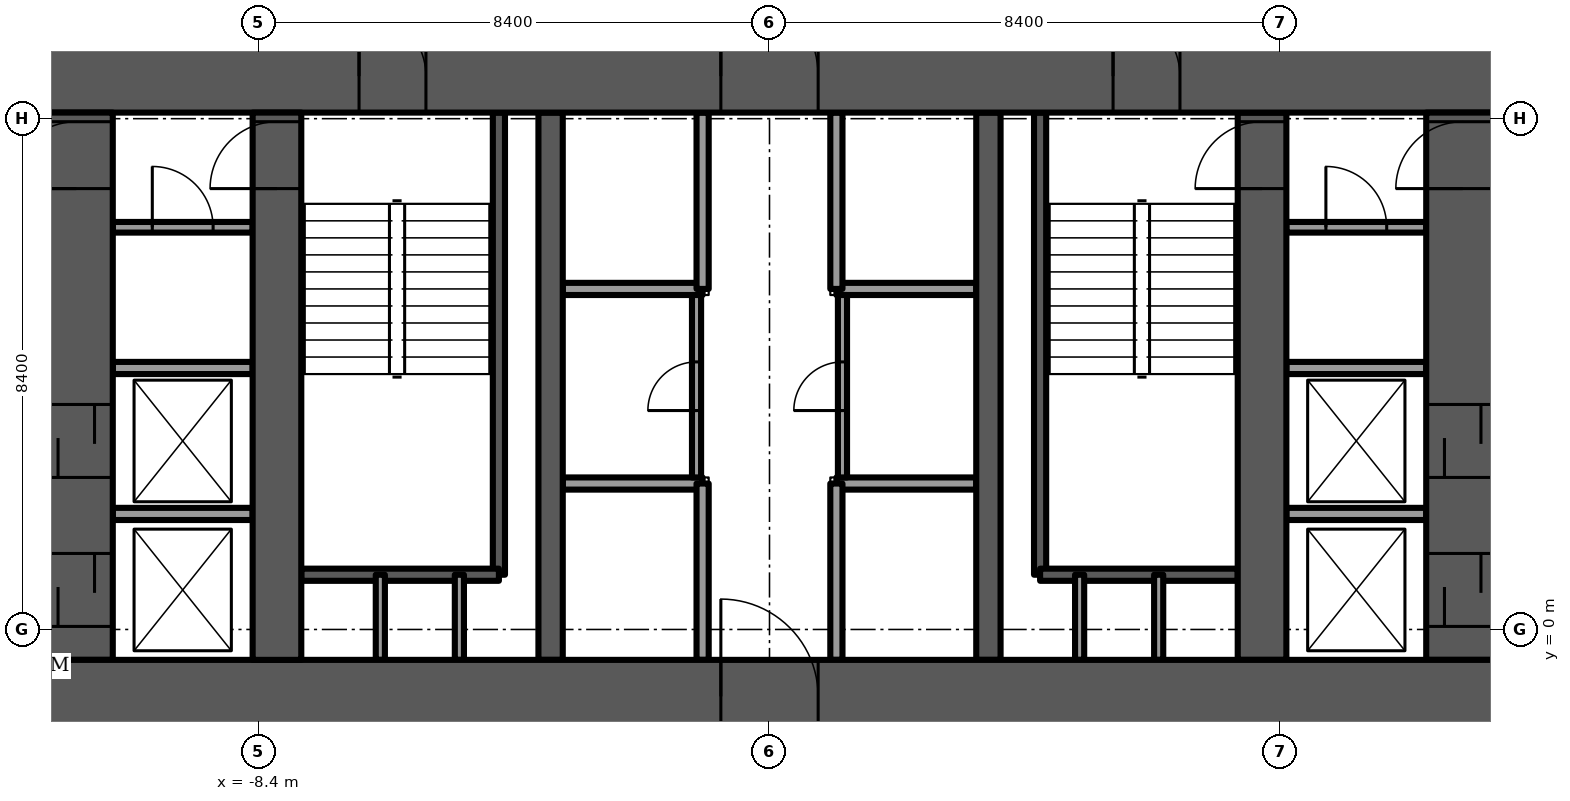
"""IFC4 building model, lengths in metres.
Left out: names, types, materials, properties, quantities, classifications, styles, units other than length and angle.
Written with IfcOpenShell. Run it as: python <this file> out.ifc"""

import sys

from ifc_helpers import new_model, si_unit, direction, frame, frame_2d, origin, place, context, subcontext, project, spatial, rectangle, extrude, element, fill, save


model = new_model("IFC4")
c1 = context("Model", 3, precision=1e-05, world=origin(), true_north=direction((0.0, 1.0)))
c2 = subcontext(c1, "Body", "Model", "MODEL_VIEW")
j1 = project(units=[si_unit("LENGTHUNIT", "METRE"), si_unit("PLANEANGLEUNIT", "RADIAN")], contexts=[c1])
p1 = place(None, origin())
s1 = spatial("IfcSite", under=j1, at=p1, CompositionType="ELEMENT")
p2 = place(p1, origin())
s2 = spatial("IfcBuilding", under=s1, at=p2, CompositionType="ELEMENT")
p3 = place(p2, frame((0.0, 0.0, 73.0)))
s3 = spatial("IfcBuildingStorey", under=s2, at=p3, CompositionType="ELEMENT", Elevation=73.0)
p4 = place(p3, frame((-12.0, -1.1, -0.3), z_axis=(0.0, 0.0, 1.0), x_axis=(1.0, 0.0, 0.0)))
e1 = element("IfcWall", 1, at=p4, inside=s3, PredefinedType="SHEAR", context=c2, shape_type="SweptSolid", body=[
    extrude(rectangle(XDim=24.0, YDim=1.2, at=frame_2d((12.0, 0.0))), origin(), (0.0, 0.0, 1.0), 3.75),
])
p5 = place(p4, frame((11.2, 0.0, 0.0)))
e2 = element("IfcOpeningElement", 2, at=p5, cuts=e1, PredefinedType="OPENING", context=c2, shape_type="SweptSolid", body=[
    extrude(rectangle(XDim=1.6, YDim=2.1, at=frame_2d((0.8, 1.05))), frame((0.0, 0.6, 0.0), z_axis=(0.0, -1.0, 0.0), x_axis=(1.0, 0.0, 0.0)), (0.0, 0.0, 1.0), 1.2),
])
p6 = place(p3, frame((-12.0, 9.1, -0.3), z_axis=(0.0, 0.0, 1.0), x_axis=(1.0, 0.0, 0.0)))
e3 = element("IfcWall", 3, at=p6, inside=s3, PredefinedType="SHEAR", context=c2, shape_type="SweptSolid", body=[
    extrude(rectangle(XDim=24.0, YDim=1.2, at=frame_2d((12.0, 0.0))), origin(), (0.0, 0.0, 1.0), 3.75),
])
p7 = place(p6, frame((11.2, 0.0, 0.0)))
e4 = element("IfcOpeningElement", 4, at=p7, cuts=e3, PredefinedType="OPENING", context=c2, shape_type="SweptSolid", body=[
    extrude(rectangle(XDim=1.6, YDim=2.1, at=frame_2d((0.8, 1.05))), frame((0.0, 0.6, 0.0), z_axis=(0.0, -1.0, 0.0), x_axis=(1.0, 0.0, 0.0)), (0.0, 0.0, 1.0), 1.2),
])
p8 = place(p6, frame((5.25, 0.0, 0.0)))
e5 = element("IfcOpeningElement", 5, at=p8, cuts=e3, PredefinedType="OPENING", context=c2, shape_type="SweptSolid", body=[
    extrude(rectangle(XDim=1.1, YDim=2.1, at=frame_2d((0.55, 1.05))), frame((0.0, 0.6, 0.0), z_axis=(0.0, -1.0, 0.0), x_axis=(1.0, 0.0, 0.0)), (0.0, 0.0, 1.0), 1.2),
])
p9 = place(p6, frame((17.65, 0.0, 0.0)))
e6 = element("IfcOpeningElement", 6, at=p9, cuts=e3, PredefinedType="OPENING", context=c2, shape_type="SweptSolid", body=[
    extrude(rectangle(XDim=1.1, YDim=2.1, at=frame_2d((0.55, 1.05))), frame((0.0, 0.6, 0.0), z_axis=(0.0, -1.0, 0.0), x_axis=(1.0, 0.0, 0.0)), (0.0, 0.0, 1.0), 1.2),
])
p10 = place(p3, frame((-8.1, -0.5, -0.3), z_axis=(0.0, 0.0, 1.0), x_axis=(0.0, 1.0, 0.0)))
e7 = element("IfcWall", 7, at=p10, inside=s3, PredefinedType="SHEAR", context=c2, shape_type="SweptSolid", body=[
    extrude(rectangle(XDim=9.0, YDim=0.8, at=frame_2d((4.5, 0.0))), origin(), (0.0, 0.0, 1.0), 3.75),
])
p11 = place(p10, frame((7.75, 0.0, 0.0)))
e8 = element("IfcOpeningElement", 8, at=p11, cuts=e7, PredefinedType="OPENING", context=c2, shape_type="SweptSolid", body=[
    extrude(rectangle(XDim=1.1, YDim=2.1, at=frame_2d((0.55, 1.05))), frame((0.0, 0.4, 0.0), z_axis=(0.0, -1.0, 0.0), x_axis=(1.0, 0.0, 0.0)), (0.0, 0.0, 1.0), 0.8),
])
p12 = place(p3, frame((8.1, -0.5, -0.3), z_axis=(0.0, 0.0, 1.0), x_axis=(0.0, 1.0, 0.0)))
e9 = element("IfcWall", 9, at=p12, inside=s3, PredefinedType="SHEAR", context=c2, shape_type="SweptSolid", body=[
    extrude(rectangle(XDim=9.0, YDim=0.8, at=frame_2d((4.5, 0.0))), origin(), (0.0, 0.0, 1.0), 3.75),
])
p13 = place(p12, frame((7.75, 0.0, 0.0)))
e10 = element("IfcOpeningElement", 10, at=p13, cuts=e9, PredefinedType="OPENING", context=c2, shape_type="SweptSolid", body=[
    extrude(rectangle(XDim=1.1, YDim=2.1, at=frame_2d((0.55, 1.05))), frame((0.0, 0.4, 0.0), z_axis=(0.0, -1.0, 0.0), x_axis=(1.0, 0.0, 0.0)), (0.0, 0.0, 1.0), 0.8),
])
for number, where, z_axis, x_axis in (
    (11, (-3.6, -0.5, -0.3), (0.0, 0.0, 1.0), (0.0, 1.0, 0.0)),
    (12, (3.6, -0.5, -0.3), (0.0, 0.0, 1.0), (0.0, 1.0, 0.0)),
):
    element("IfcWall", number, at=place(p3, frame(where, z_axis=z_axis, x_axis=x_axis)), inside=s3, PredefinedType="SHEAR", context=c2, shape_type="SweptSolid", body=[
        extrude(rectangle(XDim=9.0, YDim=0.4, at=frame_2d((4.5, 0.0))), origin(), (0.0, 0.0, 1.0), 3.75),
    ])
p14 = place(p3, frame((-11.4, -0.5, -0.3), z_axis=(0.0, 0.0, 1.0), x_axis=(0.0, 1.0, 0.0)))
e13 = element("IfcWall", 13, at=p14, inside=s3, PredefinedType="SHEAR", context=c2, shape_type="SweptSolid", body=[
    extrude(rectangle(XDim=9.0, YDim=1.2, at=frame_2d((4.5, 0.0))), origin(), (0.0, 0.0, 1.0), 3.75),
])
p15 = place(p14, frame((7.75, 0.0, 0.0)))
e14 = element("IfcOpeningElement", 14, at=p15, cuts=e13, PredefinedType="OPENING", context=c2, shape_type="SweptSolid", body=[
    extrude(rectangle(XDim=1.1, YDim=2.1, at=frame_2d((0.55, 1.05))), frame((0.0, 0.6, 0.0), z_axis=(0.0, -1.0, 0.0), x_axis=(1.0, 0.0, 0.0)), (0.0, 0.0, 1.0), 1.2),
])
p16 = place(p14, frame((0.55, 0.0, 0.0)))
e15 = element("IfcOpeningElement", 15, at=p16, cuts=e13, PredefinedType="OPENING", context=c2, shape_type="SweptSolid", body=[
    extrude(rectangle(XDim=1.2, YDim=2.1, at=frame_2d((0.6, 1.05))), frame((0.0, 0.6, 0.0), z_axis=(0.0, -1.0, 0.0), x_axis=(1.0, 0.0, 0.0)), (0.0, 0.0, 1.0), 1.2),
])
p17 = place(p14, frame((3.0, 0.0, 0.0)))
e16 = element("IfcOpeningElement", 16, at=p17, cuts=e13, PredefinedType="OPENING", context=c2, shape_type="SweptSolid", body=[
    extrude(rectangle(XDim=1.2, YDim=2.1, at=frame_2d((0.6, 1.05))), frame((0.0, 0.6, 0.0), z_axis=(0.0, -1.0, 0.0), x_axis=(1.0, 0.0, 0.0)), (0.0, 0.0, 1.0), 1.2),
])
p18 = place(p3, frame((11.4, -0.5, -0.3), z_axis=(0.0, 0.0, 1.0), x_axis=(0.0, 1.0, 0.0)))
e17 = element("IfcWall", 17, at=p18, inside=s3, PredefinedType="SHEAR", context=c2, shape_type="SweptSolid", body=[
    extrude(rectangle(XDim=9.0, YDim=1.2, at=frame_2d((4.5, 0.0))), origin(), (0.0, 0.0, 1.0), 3.75),
])
p19 = place(p18, frame((7.75, 0.0, 0.0)))
e18 = element("IfcOpeningElement", 18, at=p19, cuts=e17, PredefinedType="OPENING", context=c2, shape_type="SweptSolid", body=[
    extrude(rectangle(XDim=1.1, YDim=2.1, at=frame_2d((0.55, 1.05))), frame((0.0, 0.6, 0.0), z_axis=(0.0, -1.0, 0.0), x_axis=(1.0, 0.0, 0.0)), (0.0, 0.0, 1.0), 1.2),
])
p20 = place(p18, frame((0.55, 0.0, 0.0)))
e19 = element("IfcOpeningElement", 19, at=p20, cuts=e17, PredefinedType="OPENING", context=c2, shape_type="SweptSolid", body=[
    extrude(rectangle(XDim=1.2, YDim=2.1, at=frame_2d((0.6, 1.05))), frame((0.0, 0.6, 0.0), z_axis=(0.0, -1.0, 0.0), x_axis=(1.0, 0.0, 0.0)), (0.0, 0.0, 1.0), 1.2),
])
p21 = place(p18, frame((3.0, 0.0, 0.0)))
e20 = element("IfcOpeningElement", 20, at=p21, cuts=e17, PredefinedType="OPENING", context=c2, shape_type="SweptSolid", body=[
    extrude(rectangle(XDim=1.2, YDim=2.1, at=frame_2d((0.6, 1.05))), frame((0.0, 0.6, 0.0), z_axis=(0.0, -1.0, 0.0), x_axis=(1.0, 0.0, 0.0)), (0.0, 0.0, 1.0), 1.2),
])
for number, where, z_axis, x_axis in (
    (21, (-3.4, 2.4, 0.0), (0.0, 0.0, 1.0), (1.0, 0.0, 0.0)),
    (22, (-3.4, 5.6, 0.0), (0.0, 0.0, 1.0), (1.0, 0.0, 0.0)),
    (23, (1.1, 2.4, 0.0), (0.0, 0.0, 1.0), (1.0, 0.0, 0.0)),
    (24, (1.1, 5.6, 0.0), (0.0, 0.0, 1.0), (1.0, 0.0, 0.0)),
):
    element("IfcWall", number, at=place(p3, frame(where, z_axis=z_axis, x_axis=x_axis)), inside=s3, PredefinedType="PARTITIONING", context=c2, shape_type="SweptSolid", body=[
        extrude(rectangle(XDim=2.3, YDim=0.2, at=frame_2d((1.15, 0.0))), origin(), (0.0, 0.0, 1.0), 3.45),
    ])
for number, where, z_axis, x_axis in (
    (25, (-1.1, -0.5, 0.0), (0.0, 0.0, 1.0), (0.0, 1.0, 0.0)),
    (26, (1.1, -0.5, 0.0), (0.0, 0.0, 1.0), (0.0, 1.0, 0.0)),
    (27, (-1.1, 5.6, 0.0), (0.0, 0.0, 1.0), (0.0, 1.0, 0.0)),
    (28, (1.1, 5.6, 0.0), (0.0, 0.0, 1.0), (0.0, 1.0, 0.0)),
):
    element("IfcWall", number, at=place(p3, frame(where, z_axis=z_axis, x_axis=x_axis)), inside=s3, PredefinedType="PARTITIONING", context=c2, shape_type="SweptSolid", body=[
        extrude(rectangle(XDim=2.9, YDim=0.2, at=frame_2d((1.45, 0.0))), origin(), (0.0, 0.0, 1.0), 3.45),
    ])
p22 = place(p3, frame((-4.45, 0.9, -0.3), z_axis=(0.0, 0.0, 1.0), x_axis=(0.0, 1.0, 0.0)))
e29 = element("IfcWall", 29, at=p22, inside=s3, PredefinedType="SOLIDWALL", context=c2, shape_type="SweptSolid", body=[
    extrude(rectangle(XDim=7.6, YDim=0.2, at=frame_2d((3.8, 0.0))), origin(), (0.0, 0.0, 1.0), 3.75),
])
p23 = place(p3, frame((-7.7, 0.9, -0.3), z_axis=(0.0, 0.0, 1.0), x_axis=(1.0, 0.0, 0.0)))
e30 = element("IfcWall", 30, at=p23, inside=s3, PredefinedType="SOLIDWALL", context=c2, shape_type="SweptSolid", body=[
    extrude(rectangle(XDim=3.25, YDim=0.2, at=frame_2d((1.625, 0.0))), origin(), (0.0, 0.0, 1.0), 3.75),
])
for number, where, z_axis, x_axis in (
    (31, (-6.4, -0.5, 0.0), (0.0, 0.0, 1.0), (0.0, 1.0, 0.0)),
    (32, (-5.1, -0.5, 0.0), (0.0, 0.0, 1.0), (0.0, 1.0, 0.0)),
):
    element("IfcWall", number, at=place(p3, frame(where, z_axis=z_axis, x_axis=x_axis)), inside=s3, PredefinedType="PARTITIONING", context=c2, shape_type="SweptSolid", body=[
        extrude(rectangle(XDim=1.4, YDim=0.15, at=frame_2d((0.7, 0.0))), origin(), (0.0, 0.0, 1.0), 3.45),
    ])
p24 = place(p3, frame((4.45, 0.9, -0.3), z_axis=(0.0, 0.0, 1.0), x_axis=(0.0, 1.0, 0.0)))
e33 = element("IfcWall", 33, at=p24, inside=s3, PredefinedType="SOLIDWALL", context=c2, shape_type="SweptSolid", body=[
    extrude(rectangle(XDim=7.6, YDim=0.2, at=frame_2d((3.8, 0.0))), origin(), (0.0, 0.0, 1.0), 3.75),
])
p25 = place(p3, frame((4.45, 0.9, -0.3), z_axis=(0.0, 0.0, 1.0), x_axis=(1.0, 0.0, 0.0)))
e34 = element("IfcWall", 34, at=p25, inside=s3, PredefinedType="SOLIDWALL", context=c2, shape_type="SweptSolid", body=[
    extrude(rectangle(XDim=3.25, YDim=0.2, at=frame_2d((1.625, 0.0))), origin(), (0.0, 0.0, 1.0), 3.75),
])
for number, where, z_axis, x_axis in (
    (35, (5.1, -0.5, 0.0), (0.0, 0.0, 1.0), (0.0, 1.0, 0.0)),
    (36, (6.4, -0.5, 0.0), (0.0, 0.0, 1.0), (0.0, 1.0, 0.0)),
):
    element("IfcWall", number, at=place(p3, frame(where, z_axis=z_axis, x_axis=x_axis)), inside=s3, PredefinedType="PARTITIONING", context=c2, shape_type="SweptSolid", body=[
        extrude(rectangle(XDim=1.4, YDim=0.15, at=frame_2d((0.7, 0.0))), origin(), (0.0, 0.0, 1.0), 3.45),
    ])
p26 = place(p3, frame((-1.2, 2.5, 0.0), z_axis=(0.0, 0.0, 1.0), x_axis=(0.0, 1.0, 0.0)))
e37 = element("IfcWall", 37, at=p26, inside=s3, PredefinedType="PARTITIONING", context=c2, shape_type="SweptSolid", body=[
    extrude(rectangle(XDim=3.0, YDim=0.15, at=frame_2d((1.5, 0.0))), origin(), (0.0, 0.0, 1.0), 3.45),
])
p27 = place(p26, frame((1.1, 0.0, 0.0)))
e38 = element("IfcOpeningElement", 38, at=p27, cuts=e37, PredefinedType="OPENING", context=c2, shape_type="SweptSolid", body=[
    extrude(rectangle(XDim=0.8, YDim=2.1, at=frame_2d((0.4, 1.05))), frame((0.0, 0.075, 0.0), z_axis=(0.0, -1.0, 0.0), x_axis=(1.0, 0.0, 0.0)), (0.0, 0.0, 1.0), 0.15),
])
p28 = place(p3, frame((1.2, 2.5, 0.0), z_axis=(0.0, 0.0, 1.0), x_axis=(0.0, 1.0, 0.0)))
e39 = element("IfcWall", 39, at=p28, inside=s3, PredefinedType="PARTITIONING", context=c2, shape_type="SweptSolid", body=[
    extrude(rectangle(XDim=3.0, YDim=0.15, at=frame_2d((1.5, 0.0))), origin(), (0.0, 0.0, 1.0), 3.45),
])
p29 = place(p28, frame((1.1, 0.0, 0.0)))
e40 = element("IfcOpeningElement", 40, at=p29, cuts=e39, PredefinedType="OPENING", context=c2, shape_type="SweptSolid", body=[
    extrude(rectangle(XDim=0.8, YDim=2.1, at=frame_2d((0.4, 1.05))), frame((0.0, 0.075, 0.0), z_axis=(0.0, -1.0, 0.0), x_axis=(1.0, 0.0, 0.0)), (0.0, 0.0, 1.0), 0.15),
])
for number, where, z_axis, x_axis in (
    (41, (-10.8, 1.9, 0.0), (0.0, 0.0, 1.0), (1.0, 0.0, 0.0)),
    (42, (-10.8, 4.3, 0.0), (0.0, 0.0, 1.0), (1.0, 0.0, 0.0)),
):
    element("IfcWall", number, at=place(p3, frame(where, z_axis=z_axis, x_axis=x_axis)), inside=s3, PredefinedType="PARTITIONING", context=c2, shape_type="SweptSolid", body=[
        extrude(rectangle(XDim=2.3, YDim=0.2, at=frame_2d((1.15, 0.0))), origin(), (0.0, 0.0, 1.0), 3.45),
    ])
p30 = place(p3, frame((-10.8, 6.614, 0.0), z_axis=(0.0, 0.0, 1.0), x_axis=(1.0, 0.0, 0.0)))
e43 = element("IfcWall", 43, at=p30, inside=s3, PredefinedType="PARTITIONING", context=c2, shape_type="SweptSolid", body=[
    extrude(rectangle(XDim=2.3, YDim=0.175, at=frame_2d((1.15, 0.0))), origin(), (0.0, 0.0, 1.0), 3.45),
])
p31 = place(p30, frame((0.65, 0.0, 0.0)))
e44 = element("IfcOpeningElement", 44, at=p31, cuts=e43, PredefinedType="OPENING", context=c2, shape_type="SweptSolid", body=[
    extrude(rectangle(XDim=1.0, YDim=2.1, at=frame_2d((0.5, 1.05))), frame((0.0, 0.087, 0.0), z_axis=(0.0, -1.0, 0.0), x_axis=(1.0, 0.0, 0.0)), (0.0, 0.0, 1.0), 0.175),
])
for number, where, z_axis, x_axis in (
    (45, (8.5, 1.9, 0.0), (0.0, 0.0, 1.0), (1.0, 0.0, 0.0)),
    (46, (8.5, 4.3, 0.0), (0.0, 0.0, 1.0), (1.0, 0.0, 0.0)),
):
    element("IfcWall", number, at=place(p3, frame(where, z_axis=z_axis, x_axis=x_axis)), inside=s3, PredefinedType="PARTITIONING", context=c2, shape_type="SweptSolid", body=[
        extrude(rectangle(XDim=2.3, YDim=0.2, at=frame_2d((1.15, 0.0))), origin(), (0.0, 0.0, 1.0), 3.45),
    ])
p32 = place(p3, frame((8.5, 6.614, 0.0), z_axis=(0.0, 0.0, 1.0), x_axis=(1.0, 0.0, 0.0)))
e47 = element("IfcWall", 47, at=p32, inside=s3, PredefinedType="PARTITIONING", context=c2, shape_type="SweptSolid", body=[
    extrude(rectangle(XDim=2.3, YDim=0.175, at=frame_2d((1.15, 0.0))), origin(), (0.0, 0.0, 1.0), 3.45),
])
p33 = place(p32, frame((0.65, 0.0, 0.0)))
e48 = element("IfcOpeningElement", 48, at=p33, cuts=e47, PredefinedType="OPENING", context=c2, shape_type="SweptSolid", body=[
    extrude(rectangle(XDim=1.0, YDim=2.1, at=frame_2d((0.5, 1.05))), frame((0.0, 0.087, 0.0), z_axis=(0.0, -1.0, 0.0), x_axis=(1.0, 0.0, 0.0)), (0.0, 0.0, 1.0), 0.175),
])
p34 = place(p5, origin())
e49 = element("IfcDoor", 49, at=p34, inside=s3, OperationType="DOUBLE_DOOR_SINGLE_SWING", PredefinedType="DOOR", context=c2, shape_type="SweptSolid", body=[
    extrude(rectangle(XDim=1.6, YDim=2.1, at=frame_2d((0.8, 1.05))), frame((0.0, 0.025, 0.0), z_axis=(0.0, -1.0, 0.0), x_axis=(1.0, 0.0, 0.0)), (0.0, 0.0, 1.0), 0.05),
])
fill(e2, e49)
p35 = place(p7, origin())
e50 = element("IfcDoor", 50, at=p35, inside=s3, OperationType="DOUBLE_DOOR_SINGLE_SWING", PredefinedType="DOOR", context=c2, shape_type="SweptSolid", body=[
    extrude(rectangle(XDim=1.6, YDim=2.1, at=frame_2d((0.8, 1.05))), frame((0.0, 0.025, 0.0), z_axis=(0.0, -1.0, 0.0), x_axis=(1.0, 0.0, 0.0)), (0.0, 0.0, 1.0), 0.05),
])
fill(e4, e50)
p36 = place(p8, origin())
e51 = element("IfcDoor", 51, at=p36, inside=s3, OperationType="SINGLE_SWING_LEFT", PredefinedType="DOOR", context=c2, shape_type="SweptSolid", body=[
    extrude(rectangle(XDim=1.1, YDim=2.1, at=frame_2d((0.55, 1.05))), frame((0.0, 0.025, 0.0), z_axis=(0.0, -1.0, 0.0), x_axis=(1.0, 0.0, 0.0)), (0.0, 0.0, 1.0), 0.05),
])
fill(e5, e51)
p37 = place(p11, origin())
e52 = element("IfcDoor", 52, at=p37, inside=s3, OperationType="SINGLE_SWING_RIGHT", PredefinedType="DOOR", context=c2, shape_type="SweptSolid", body=[
    extrude(rectangle(XDim=1.1, YDim=2.1, at=frame_2d((0.55, 1.05))), frame((0.0, 0.025, 0.0), z_axis=(0.0, -1.0, 0.0), x_axis=(1.0, 0.0, 0.0)), (0.0, 0.0, 1.0), 0.05),
])
fill(e8, e52)
p38 = place(p9, origin())
e53 = element("IfcDoor", 53, at=p38, inside=s3, OperationType="SINGLE_SWING_RIGHT", PredefinedType="DOOR", context=c2, shape_type="SweptSolid", body=[
    extrude(rectangle(XDim=1.1, YDim=2.1, at=frame_2d((0.55, 1.05))), frame((0.0, 0.025, 0.0), z_axis=(0.0, -1.0, 0.0), x_axis=(1.0, 0.0, 0.0)), (0.0, 0.0, 1.0), 0.05),
])
fill(e6, e53)
p39 = place(p13, origin())
e54 = element("IfcDoor", 54, at=p39, inside=s3, OperationType="SINGLE_SWING_LEFT", PredefinedType="DOOR", context=c2, shape_type="SweptSolid", body=[
    extrude(rectangle(XDim=1.1, YDim=2.1, at=frame_2d((0.55, 1.05))), frame((0.0, 0.025, 0.0), z_axis=(0.0, -1.0, 0.0), x_axis=(1.0, 0.0, 0.0)), (0.0, 0.0, 1.0), 0.05),
])
fill(e10, e54)
p40 = place(p27, origin())
e55 = element("IfcDoor", 55, at=p40, inside=s3, OperationType="SINGLE_SWING_LEFT", PredefinedType="DOOR", context=c2, shape_type="SweptSolid", body=[
    extrude(rectangle(XDim=0.8, YDim=2.1, at=frame_2d((0.4, 1.05))), frame((0.0, 0.025, 0.0), z_axis=(0.0, -1.0, 0.0), x_axis=(1.0, 0.0, 0.0)), (0.0, 0.0, 1.0), 0.05),
])
fill(e38, e55)
p41 = place(p29, origin())
e56 = element("IfcDoor", 56, at=p41, inside=s3, OperationType="SINGLE_SWING_RIGHT", PredefinedType="DOOR", context=c2, shape_type="SweptSolid", body=[
    extrude(rectangle(XDim=0.8, YDim=2.1, at=frame_2d((0.4, 1.05))), frame((0.0, 0.025, 0.0), z_axis=(0.0, -1.0, 0.0), x_axis=(1.0, 0.0, 0.0)), (0.0, 0.0, 1.0), 0.05),
])
fill(e40, e56)
p42 = place(p31, origin())
e57 = element("IfcDoor", 57, at=p42, inside=s3, OperationType="SINGLE_SWING_LEFT", PredefinedType="DOOR", context=c2, shape_type="SweptSolid", body=[
    extrude(rectangle(XDim=1.0, YDim=2.1, at=frame_2d((0.5, 1.05))), frame((0.0, 0.025, 0.0), z_axis=(0.0, -1.0, 0.0), x_axis=(1.0, 0.0, 0.0)), (0.0, 0.0, 1.0), 0.05),
])
fill(e44, e57)
p43 = place(p15, origin())
e58 = element("IfcDoor", 58, at=p43, inside=s3, OperationType="SINGLE_SWING_LEFT", PredefinedType="DOOR", context=c2, shape_type="SweptSolid", body=[
    extrude(rectangle(XDim=1.1, YDim=2.1, at=frame_2d((0.55, 1.05))), frame((0.0, 0.025, 0.0), z_axis=(0.0, -1.0, 0.0), x_axis=(1.0, 0.0, 0.0)), (0.0, 0.0, 1.0), 0.05),
])
fill(e14, e58)
p44 = place(p16, origin())
e59 = element("IfcDoor", 59, at=p44, inside=s3, OperationType="SLIDING_TO_LEFT", PredefinedType="DOOR", context=c2, shape_type="SweptSolid", body=[
    extrude(rectangle(XDim=1.2, YDim=2.1, at=frame_2d((0.6, 1.05))), frame((0.0, 0.025, 0.0), z_axis=(0.0, -1.0, 0.0), x_axis=(1.0, 0.0, 0.0)), (0.0, 0.0, 1.0), 0.05),
])
fill(e15, e59)
p45 = place(p17, origin())
e60 = element("IfcDoor", 60, at=p45, inside=s3, OperationType="SLIDING_TO_LEFT", PredefinedType="DOOR", context=c2, shape_type="SweptSolid", body=[
    extrude(rectangle(XDim=1.2, YDim=2.1, at=frame_2d((0.6, 1.05))), frame((0.0, 0.025, 0.0), z_axis=(0.0, -1.0, 0.0), x_axis=(1.0, 0.0, 0.0)), (0.0, 0.0, 1.0), 0.05),
])
fill(e16, e60)
p46 = place(p33, origin())
e61 = element("IfcDoor", 61, at=p46, inside=s3, OperationType="SINGLE_SWING_RIGHT", PredefinedType="DOOR", context=c2, shape_type="SweptSolid", body=[
    extrude(rectangle(XDim=1.0, YDim=2.1, at=frame_2d((0.5, 1.05))), frame((0.0, 0.025, 0.0), z_axis=(0.0, -1.0, 0.0), x_axis=(1.0, 0.0, 0.0)), (0.0, 0.0, 1.0), 0.05),
])
fill(e48, e61)
p47 = place(p19, origin())
e62 = element("IfcDoor", 62, at=p47, inside=s3, OperationType="SINGLE_SWING_RIGHT", PredefinedType="DOOR", context=c2, shape_type="SweptSolid", body=[
    extrude(rectangle(XDim=1.1, YDim=2.1, at=frame_2d((0.55, 1.05))), frame((0.0, 0.025, 0.0), z_axis=(0.0, -1.0, 0.0), x_axis=(1.0, 0.0, 0.0)), (0.0, 0.0, 1.0), 0.05),
])
fill(e18, e62)
p48 = place(p20, origin())
e63 = element("IfcDoor", 63, at=p48, inside=s3, OperationType="SLIDING_TO_LEFT", PredefinedType="DOOR", context=c2, shape_type="SweptSolid", body=[
    extrude(rectangle(XDim=1.2, YDim=2.1, at=frame_2d((0.6, 1.05))), frame((0.0, 0.025, 0.0), z_axis=(0.0, -1.0, 0.0), x_axis=(1.0, 0.0, 0.0)), (0.0, 0.0, 1.0), 0.05),
])
fill(e19, e63)
p49 = place(p21, origin())
e64 = element("IfcDoor", 64, at=p49, inside=s3, OperationType="SLIDING_TO_LEFT", PredefinedType="DOOR", context=c2, shape_type="SweptSolid", body=[
    extrude(rectangle(XDim=1.2, YDim=2.1, at=frame_2d((0.6, 1.05))), frame((0.0, 0.025, 0.0), z_axis=(0.0, -1.0, 0.0), x_axis=(1.0, 0.0, 0.0)), (0.0, 0.0, 1.0), 0.05),
])
fill(e20, e64)
save(model, sys.argv[1])
